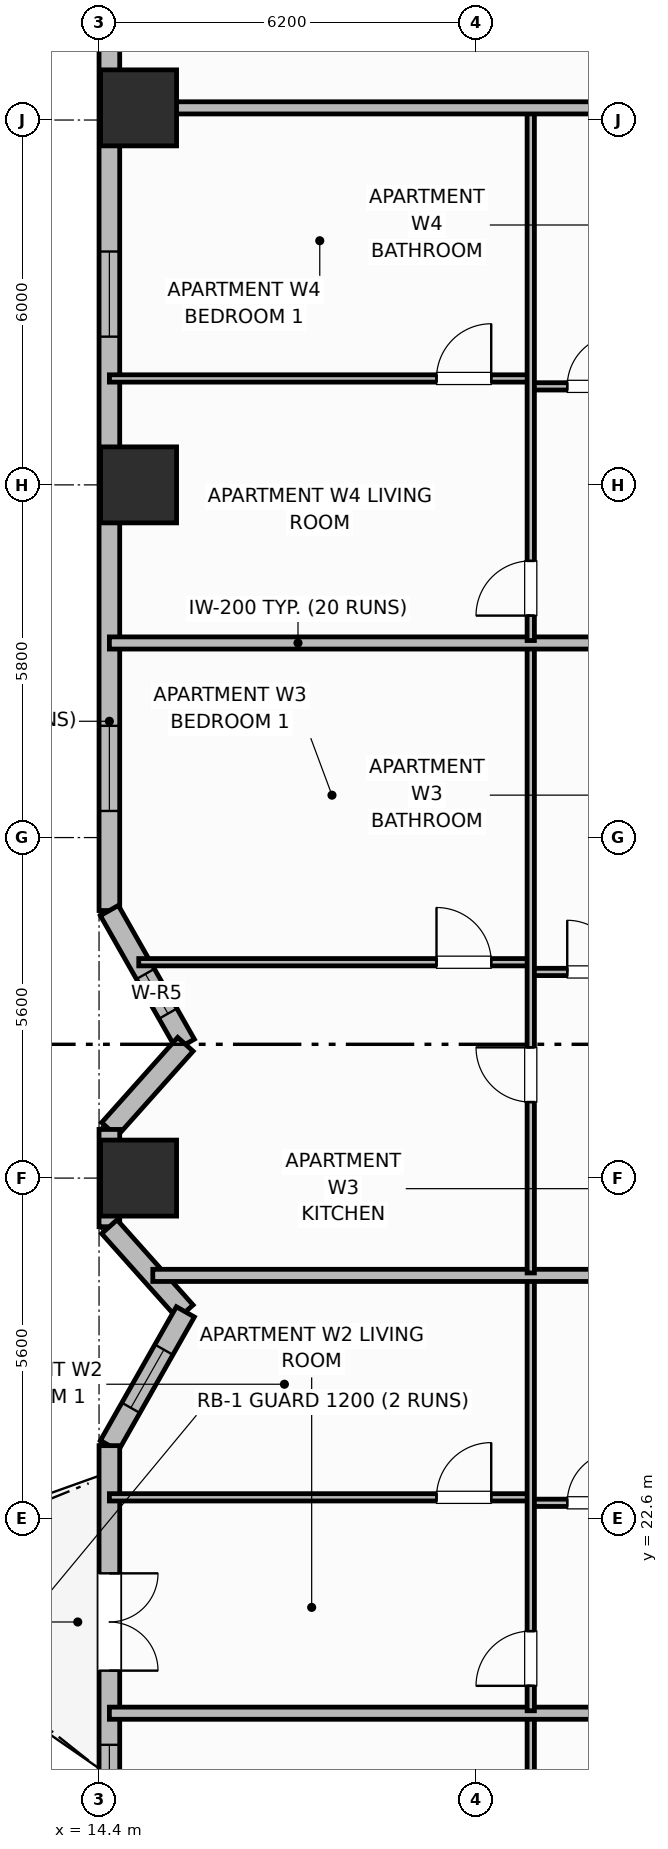
"""IFC4 building model, lengths in metres.
Left out: names, types, materials, properties, quantities, classifications, styles, units other than length and angle.
Written with IfcOpenShell. Run it as: python <this file> out.ifc"""

import sys

from ifc_helpers import new_model, si_unit, direction, frame, frame_2d, origin, origin_2d, place, context, subcontext, project, spatial, rectangle, extrude, element, fill, save


model = new_model("IFC4")
c1 = context("Model", 3, precision=1e-05, world=origin(), true_north=direction((0.0, 1.0)))
c2 = subcontext(c1, "Body", "Model", "MODEL_VIEW")
j1 = project(units=[si_unit("LENGTHUNIT", "METRE"), si_unit("PLANEANGLEUNIT", "RADIAN")], contexts=[c1])
p1 = place(None, origin())
s1 = spatial("IfcSite", under=j1, at=p1, CompositionType="ELEMENT")
p2 = place(p1, origin())
s2 = spatial("IfcBuilding", under=s1, at=p2, CompositionType="ELEMENT")
p3 = place(p2, frame((0.0, 0.0, 54.7)))
s3 = spatial("IfcBuildingStorey", under=s2, at=p3, CompositionType="ELEMENT", Elevation=54.7)
for number, where, z_axis, x_axis in (
    (1, (15.05, 28.2, 0.0), (0.0, 0.0, 1.0), (1.0, 0.0, 0.0)),
    (2, (15.05, 39.6, 0.0), (0.0, 0.0, 1.0), (1.0, 0.0, 0.0)),
    (3, (15.05, 45.8, 0.0), (0.0, 0.0, 1.0), (1.0, 0.0, 0.0)),
):
    element("IfcColumn", number, at=place(p3, frame(where, z_axis=z_axis, x_axis=x_axis)), inside=s3, PredefinedType="COLUMN", context=c2, shape_type="SweptSolid", body=[
        extrude(rectangle(XDim=1.25, YDim=1.25, at=origin_2d()), origin(), (0.0, 0.0, 1.0), 3.7),
    ])
p4 = place(p3, frame((14.57, 47.4, 0.0), z_axis=(0.0, 0.0, 1.0), x_axis=(0.0, -1.0, 0.0)))
e4 = element("IfcWall", 4, at=p4, inside=s3, PredefinedType="SOLIDWALL", context=c2, shape_type="SweptSolid", body=[
    extrude(rectangle(XDim=14.8, YDim=0.34, at=frame_2d((7.4, 0.0))), origin(), (0.0, 0.0, 1.0), 2.7),
])
p5 = place(p4, frame((3.962, 0.0, 0.73)))
e5 = element("IfcOpeningElement", 5, at=p5, cuts=e4, PredefinedType="OPENING", context=c2, shape_type="SweptSolid", body=[
    extrude(rectangle(XDim=1.4, YDim=1.85, at=frame_2d((0.7, 0.925))), frame((0.0, 0.18, 0.0), z_axis=(0.0, -1.0, 0.0), x_axis=(1.0, 0.0, 0.0)), (0.0, 0.0, 1.0), 0.36),
])
p6 = place(p4, frame((11.762, 0.0, 0.73)))
e6 = element("IfcOpeningElement", 6, at=p6, cuts=e4, PredefinedType="OPENING", context=c2, shape_type="SweptSolid", body=[
    extrude(rectangle(XDim=1.4, YDim=1.85, at=frame_2d((0.7, 0.925))), frame((0.0, 0.18, 0.0), z_axis=(0.0, -1.0, 0.0), x_axis=(1.0, 0.0, 0.0)), (0.0, 0.0, 1.0), 0.36),
])
p7 = place(p3, frame((14.57, 32.6, 0.0), z_axis=(0.0, 0.0, 1.0), x_axis=(0.493976255291, -0.869475393101, 0.0)))
e7 = element("IfcWall", 7, at=p7, inside=s3, PredefinedType="SOLIDWALL", context=c2, shape_type="SweptSolid", body=[
    extrude(rectangle(XDim=2.531, YDim=0.34, at=frame_2d((1.265, 0.0))), origin(), (0.0, 0.0, 1.0), 2.7),
])
p8 = place(p7, frame((1.2, 0.0, 0.89)))
e8 = element("IfcOpeningElement", 8, at=p8, cuts=e7, PredefinedType="OPENING", context=c2, shape_type="SweptSolid", body=[
    extrude(rectangle(XDim=0.75, YDim=1.65, at=frame_2d((0.375, 0.825))), frame((0.0, 0.18, 0.0), z_axis=(0.0, -1.0, 0.0), x_axis=(1.0, 0.0, 0.0)), (0.0, 0.0, 1.0), 0.36),
])
p9 = place(p3, frame((15.82, 30.4, 0.0), z_axis=(0.0, 0.0, 1.0), x_axis=(-0.666041619974, -0.74591457987, 0.0)))
e9 = element("IfcWall", 9, at=p9, inside=s3, PredefinedType="SOLIDWALL", context=c2, shape_type="SweptSolid", body=[
    extrude(rectangle(XDim=1.877, YDim=0.34, at=frame_2d((0.938, 0.0))), origin(), (0.0, 0.0, 1.0), 2.7),
])
p10 = place(p3, frame((14.57, 29.0, 0.0), z_axis=(0.0, 0.0, 1.0), x_axis=(0.0, -1.0, 0.0)))
e10 = element("IfcWall", 10, at=p10, inside=s3, PredefinedType="SOLIDWALL", context=c2, shape_type="SweptSolid", body=[
    extrude(rectangle(XDim=1.6, YDim=0.34, at=frame_2d((0.8, 0.0))), origin(), (0.0, 0.0, 1.0), 2.7),
])
p11 = place(p3, frame((14.57, 27.4, 0.0), z_axis=(0.0, 0.0, 1.0), x_axis=(0.666041619974, -0.74591457987, 0.0)))
e11 = element("IfcWall", 11, at=p11, inside=s3, PredefinedType="SOLIDWALL", context=c2, shape_type="SweptSolid", body=[
    extrude(rectangle(XDim=1.877, YDim=0.34, at=frame_2d((0.938, 0.0))), origin(), (0.0, 0.0, 1.0), 2.7),
])
p12 = place(p3, frame((15.82, 26.0, 0.0), z_axis=(0.0, 0.0, 1.0), x_axis=(-0.494017696272, -0.869451847873, 0.0)))
e12 = element("IfcWall", 12, at=p12, inside=s3, PredefinedType="SOLIDWALL", context=c2, shape_type="SweptSolid", body=[
    extrude(rectangle(XDim=2.53, YDim=0.34, at=frame_2d((1.265, 0.0))), origin(), (0.0, 0.0, 1.0), 2.7),
])
p13 = place(p12, frame((0.715, 0.0, 0.89)))
e13 = element("IfcOpeningElement", 13, at=p13, cuts=e12, PredefinedType="OPENING", context=c2, shape_type="SweptSolid", body=[
    extrude(rectangle(XDim=1.1, YDim=1.65, at=frame_2d((0.55, 0.825))), frame((0.0, 0.18, 0.0), z_axis=(0.0, -1.0, 0.0), x_axis=(1.0, 0.0, 0.0)), (0.0, 0.0, 1.0), 0.36),
])
p14 = place(p3, frame((14.57, 23.8, 0.0), z_axis=(0.0, 0.0, 1.0), x_axis=(0.0, -1.0, 0.0)))
e14 = element("IfcWall", 14, at=p14, inside=s3, PredefinedType="SOLIDWALL", context=c2, shape_type="SweptSolid", body=[
    extrude(rectangle(XDim=14.8, YDim=0.34, at=frame_2d((7.4, 0.0))), origin(), (0.0, 0.0, 1.0), 2.7),
])
p15 = place(p14, frame((2.1, 0.0, 0.0)))
e15 = element("IfcOpeningElement", 15, at=p15, cuts=e14, PredefinedType="OPENING", context=c2, shape_type="SweptSolid", body=[
    extrude(rectangle(XDim=1.6, YDim=2.1, at=frame_2d((0.8, 1.05))), frame((0.0, 0.18, 0.0), z_axis=(0.0, -1.0, 0.0), x_axis=(1.0, 0.0, 0.0)), (0.0, 0.0, 1.0), 0.36),
])
p16 = place(p14, frame((4.92, 0.0, 0.69)))
e16 = element("IfcOpeningElement", 16, at=p16, cuts=e14, PredefinedType="OPENING", context=c2, shape_type="SweptSolid", body=[
    extrude(rectangle(XDim=1.4, YDim=1.85, at=frame_2d((0.7, 0.925))), frame((0.0, 0.18, 0.0), z_axis=(0.0, -1.0, 0.0), x_axis=(1.0, 0.0, 0.0)), (0.0, 0.0, 1.0), 0.36),
])
p17 = place(p14, frame((9.55, 0.0, 0.93)))
e17 = element("IfcOpeningElement", 17, at=p17, cuts=e14, PredefinedType="OPENING", context=c2, shape_type="SweptSolid", body=[
    extrude(rectangle(XDim=1.1, YDim=1.65, at=frame_2d((0.55, 0.825))), frame((0.0, 0.18, 0.0), z_axis=(0.0, -1.0, 0.0), x_axis=(1.0, 0.0, 0.0)), (0.0, 0.0, 1.0), 0.36),
])
p18 = place(p3, frame((21.5, 10.64, 0.0), z_axis=(0.0, 0.0, 1.0), x_axis=(0.0, 1.0, 0.0)))
e18 = element("IfcWall", 18, at=p18, inside=s3, PredefinedType="PARTITIONING", context=c2, shape_type="SweptSolid", body=[
    extrude(rectangle(XDim=8.72, YDim=0.12, at=frame_2d((4.36, 0.0))), origin(), (0.0, 0.0, 1.0), 2.53),
])
p19 = place(p18, frame((0.41, 0.0, 0.0)))
e19 = element("IfcOpeningElement", 19, at=p19, cuts=e18, PredefinedType="OPENING", context=c2, shape_type="SweptSolid", body=[
    extrude(rectangle(XDim=0.9, YDim=2.1, at=frame_2d((0.45, 1.05))), frame((0.0, 0.07, 0.0), z_axis=(0.0, -1.0, 0.0), x_axis=(1.0, 0.0, 0.0)), (0.0, 0.0, 1.0), 0.14),
])
p20 = place(p3, frame((14.57, 19.4, 0.0), z_axis=(0.0, 0.0, 1.0), x_axis=(1.0, 0.0, 0.0)))
e20 = element("IfcWall", 20, at=p20, inside=s3, PredefinedType="PARTITIONING", context=c2, shape_type="SweptSolid", body=[
    extrude(rectangle(XDim=9.18, YDim=0.2, at=frame_2d((4.59, 0.0))), origin(), (0.0, 0.0, 1.0), 2.53),
])
p21 = place(p3, frame((21.5, 22.86, 0.0), z_axis=(0.0, 0.0, 1.0), x_axis=(1.0, 0.0, 0.0)))
e21 = element("IfcWall", 21, at=p21, inside=s3, PredefinedType="PARTITIONING", context=c2, shape_type="SweptSolid", body=[
    extrude(rectangle(XDim=2.25, YDim=0.12, at=frame_2d((1.125, 0.0))), origin(), (0.0, 0.0, 1.0), 2.53),
])
p22 = place(p21, frame((0.6, 0.0, 0.0)))
e22 = element("IfcOpeningElement", 22, at=p22, cuts=e21, PredefinedType="OPENING", context=c2, shape_type="SweptSolid", body=[
    extrude(rectangle(XDim=0.85, YDim=2.1, at=frame_2d((0.425, 1.05))), frame((0.0, 0.07, 0.0), z_axis=(0.0, -1.0, 0.0), x_axis=(1.0, 0.0, 0.0)), (0.0, 0.0, 1.0), 0.14),
])
p23 = place(p3, frame((14.57, 22.95, 0.0), z_axis=(0.0, 0.0, 1.0), x_axis=(1.0, 0.0, 0.0)))
e23 = element("IfcWall", 23, at=p23, inside=s3, PredefinedType="PARTITIONING", context=c2, shape_type="SweptSolid", body=[
    extrude(rectangle(XDim=6.93, YDim=0.12, at=frame_2d((3.465, 0.0))), origin(), (0.0, 0.0, 1.0), 2.53),
])
p24 = place(p23, frame((5.38, 0.0, 0.0)))
e24 = element("IfcOpeningElement", 24, at=p24, cuts=e23, PredefinedType="OPENING", context=c2, shape_type="SweptSolid", body=[
    extrude(rectangle(XDim=0.9, YDim=2.1, at=frame_2d((0.45, 1.05))), frame((0.0, 0.07, 0.0), z_axis=(0.0, -1.0, 0.0), x_axis=(1.0, 0.0, 0.0)), (0.0, 0.0, 1.0), 0.14),
])
p25 = place(p3, frame((21.5, 19.44, 0.0), z_axis=(0.0, 0.0, 1.0), x_axis=(0.0, 1.0, 0.0)))
e25 = element("IfcWall", 25, at=p25, inside=s3, PredefinedType="PARTITIONING", context=c2, shape_type="SweptSolid", body=[
    extrude(rectangle(XDim=7.12, YDim=0.12, at=frame_2d((3.56, 0.0))), origin(), (0.0, 0.0, 1.0), 2.53),
])
p26 = place(p25, frame((0.41, 0.0, 0.0)))
e26 = element("IfcOpeningElement", 26, at=p26, cuts=e25, PredefinedType="OPENING", context=c2, shape_type="SweptSolid", body=[
    extrude(rectangle(XDim=0.9, YDim=2.1, at=frame_2d((0.45, 1.05))), frame((0.0, 0.07, 0.0), z_axis=(0.0, -1.0, 0.0), x_axis=(1.0, 0.0, 0.0)), (0.0, 0.0, 1.0), 0.14),
])
p27 = place(p3, frame((15.284, 26.6, 0.0), z_axis=(0.0, 0.0, 1.0), x_axis=(1.0, 0.0, 0.0)))
e27 = element("IfcWall", 27, at=p27, inside=s3, PredefinedType="PARTITIONING", context=c2, shape_type="SweptSolid", body=[
    extrude(rectangle(XDim=8.466, YDim=0.2, at=frame_2d((4.233, 0.0))), origin(), (0.0, 0.0, 1.0), 2.53),
])
p28 = place(p3, frame((21.5, 31.59, 0.0), z_axis=(0.0, 0.0, 1.0), x_axis=(1.0, 0.0, 0.0)))
e28 = element("IfcWall", 28, at=p28, inside=s3, PredefinedType="PARTITIONING", context=c2, shape_type="SweptSolid", body=[
    extrude(rectangle(XDim=2.25, YDim=0.12, at=frame_2d((1.125, 0.0))), origin(), (0.0, 0.0, 1.0), 2.53),
])
p29 = place(p28, frame((0.6, 0.0, 0.0)))
e29 = element("IfcOpeningElement", 29, at=p29, cuts=e28, PredefinedType="OPENING", context=c2, shape_type="SweptSolid", body=[
    extrude(rectangle(XDim=0.85, YDim=2.1, at=frame_2d((0.425, 1.05))), frame((0.0, 0.07, 0.0), z_axis=(0.0, -1.0, 0.0), x_axis=(1.0, 0.0, 0.0)), (0.0, 0.0, 1.0), 0.14),
])
p30 = place(p3, frame((15.053, 31.75, 0.0), z_axis=(0.0, 0.0, 1.0), x_axis=(1.0, 0.0, 0.0)))
e30 = element("IfcWall", 30, at=p30, inside=s3, PredefinedType="PARTITIONING", context=c2, shape_type="SweptSolid", body=[
    extrude(rectangle(XDim=6.447, YDim=0.12, at=frame_2d((3.224, 0.0))), origin(), (0.0, 0.0, 1.0), 2.53),
])
p31 = place(p30, frame((4.897, 0.0, 0.0)))
e31 = element("IfcOpeningElement", 31, at=p31, cuts=e30, PredefinedType="OPENING", context=c2, shape_type="SweptSolid", body=[
    extrude(rectangle(XDim=0.9, YDim=2.1, at=frame_2d((0.45, 1.05))), frame((0.0, 0.07, 0.0), z_axis=(0.0, -1.0, 0.0), x_axis=(1.0, 0.0, 0.0)), (0.0, 0.0, 1.0), 0.14),
])
p32 = place(p3, frame((21.5, 26.64, 0.0), z_axis=(0.0, 0.0, 1.0), x_axis=(0.0, 1.0, 0.0)))
e32 = element("IfcWall", 32, at=p32, inside=s3, PredefinedType="PARTITIONING", context=c2, shape_type="SweptSolid", body=[
    extrude(rectangle(XDim=10.32, YDim=0.12, at=frame_2d((5.16, 0.0))), origin(), (0.0, 0.0, 1.0), 2.53),
])
p33 = place(p32, frame((2.81, 0.0, 0.0)))
e33 = element("IfcOpeningElement", 33, at=p33, cuts=e32, PredefinedType="OPENING", context=c2, shape_type="SweptSolid", body=[
    extrude(rectangle(XDim=0.9, YDim=2.1, at=frame_2d((0.45, 1.05))), frame((0.0, 0.07, 0.0), z_axis=(0.0, -1.0, 0.0), x_axis=(1.0, 0.0, 0.0)), (0.0, 0.0, 1.0), 0.14),
])
p34 = place(p3, frame((14.57, 37.0, 0.0), z_axis=(0.0, 0.0, 1.0), x_axis=(1.0, 0.0, 0.0)))
e34 = element("IfcWall", 34, at=p34, inside=s3, PredefinedType="PARTITIONING", context=c2, shape_type="SweptSolid", body=[
    extrude(rectangle(XDim=9.18, YDim=0.2, at=frame_2d((4.59, 0.0))), origin(), (0.0, 0.0, 1.0), 2.53),
])
p35 = place(p3, frame((21.5, 41.22, 0.0), z_axis=(0.0, 0.0, 1.0), x_axis=(1.0, 0.0, 0.0)))
e35 = element("IfcWall", 35, at=p35, inside=s3, PredefinedType="PARTITIONING", context=c2, shape_type="SweptSolid", body=[
    extrude(rectangle(XDim=2.25, YDim=0.12, at=frame_2d((1.125, 0.0))), origin(), (0.0, 0.0, 1.0), 2.53),
])
p36 = place(p35, frame((0.6, 0.0, 0.0)))
e36 = element("IfcOpeningElement", 36, at=p36, cuts=e35, PredefinedType="OPENING", context=c2, shape_type="SweptSolid", body=[
    extrude(rectangle(XDim=0.85, YDim=2.1, at=frame_2d((0.425, 1.05))), frame((0.0, 0.07, 0.0), z_axis=(0.0, -1.0, 0.0), x_axis=(1.0, 0.0, 0.0)), (0.0, 0.0, 1.0), 0.14),
])
p37 = place(p3, frame((14.57, 41.35, 0.0), z_axis=(0.0, 0.0, 1.0), x_axis=(1.0, 0.0, 0.0)))
e37 = element("IfcWall", 37, at=p37, inside=s3, PredefinedType="PARTITIONING", context=c2, shape_type="SweptSolid", body=[
    extrude(rectangle(XDim=6.93, YDim=0.12, at=frame_2d((3.465, 0.0))), origin(), (0.0, 0.0, 1.0), 2.53),
])
p38 = place(p37, frame((5.38, 0.0, 0.0)))
e38 = element("IfcOpeningElement", 38, at=p38, cuts=e37, PredefinedType="OPENING", context=c2, shape_type="SweptSolid", body=[
    extrude(rectangle(XDim=0.9, YDim=2.1, at=frame_2d((0.45, 1.05))), frame((0.0, 0.07, 0.0), z_axis=(0.0, -1.0, 0.0), x_axis=(1.0, 0.0, 0.0)), (0.0, 0.0, 1.0), 0.14),
])
p39 = place(p3, frame((21.5, 37.04, 0.0), z_axis=(0.0, 0.0, 1.0), x_axis=(0.0, 1.0, 0.0)))
e39 = element("IfcWall", 39, at=p39, inside=s3, PredefinedType="PARTITIONING", context=c2, shape_type="SweptSolid", body=[
    extrude(rectangle(XDim=8.72, YDim=0.12, at=frame_2d((4.36, 0.0))), origin(), (0.0, 0.0, 1.0), 2.53),
])
p40 = place(p39, frame((0.41, 0.0, 0.0)))
e40 = element("IfcOpeningElement", 40, at=p40, cuts=e39, PredefinedType="OPENING", context=c2, shape_type="SweptSolid", body=[
    extrude(rectangle(XDim=0.9, YDim=2.1, at=frame_2d((0.45, 1.05))), frame((0.0, 0.07, 0.0), z_axis=(0.0, -1.0, 0.0), x_axis=(1.0, 0.0, 0.0)), (0.0, 0.0, 1.0), 0.14),
])
p41 = place(p3, frame((14.99, 45.8, 0.0), z_axis=(0.0, 0.0, 1.0), x_axis=(1.0, 0.0, 0.0)))
e41 = element("IfcWall", 41, at=p41, inside=s3, PredefinedType="PARTITIONING", context=c2, shape_type="SweptSolid", body=[
    extrude(rectangle(XDim=8.76, YDim=0.2, at=frame_2d((4.38, 0.0))), origin(), (0.0, 0.0, 1.0), 2.53),
])
p42 = place(p5, origin())
e42 = element("IfcWindow", 42, at=p42, inside=s3, PartitioningType="SINGLE_PANEL", PredefinedType="WINDOW", context=c2, shape_type="SweptSolid", body=[
    extrude(rectangle(XDim=1.4, YDim=1.85, at=frame_2d((0.7, 0.925))), frame((0.0, 0.03, 0.0), z_axis=(0.0, -1.0, 0.0), x_axis=(1.0, 0.0, 0.0)), (0.0, 0.0, 1.0), 0.06),
])
fill(e5, e42)
p43 = place(p6, origin())
e43 = element("IfcWindow", 43, at=p43, inside=s3, PartitioningType="SINGLE_PANEL", PredefinedType="WINDOW", context=c2, shape_type="SweptSolid", body=[
    extrude(rectangle(XDim=1.4, YDim=1.85, at=frame_2d((0.7, 0.925))), frame((0.0, 0.03, 0.0), z_axis=(0.0, -1.0, 0.0), x_axis=(1.0, 0.0, 0.0)), (0.0, 0.0, 1.0), 0.06),
])
fill(e6, e43)
p44 = place(p8, origin())
e44 = element("IfcWindow", 44, at=p44, inside=s3, PartitioningType="SINGLE_PANEL", PredefinedType="WINDOW", context=c2, shape_type="SweptSolid", body=[
    extrude(rectangle(XDim=0.75, YDim=1.65, at=frame_2d((0.375, 0.825))), frame((0.0, 0.03, 0.0), z_axis=(0.0, -1.0, 0.0), x_axis=(1.0, 0.0, 0.0)), (0.0, 0.0, 1.0), 0.06),
])
fill(e8, e44)
p45 = place(p13, origin())
e45 = element("IfcWindow", 45, at=p45, inside=s3, PartitioningType="SINGLE_PANEL", PredefinedType="WINDOW", context=c2, shape_type="SweptSolid", body=[
    extrude(rectangle(XDim=1.1, YDim=1.65, at=frame_2d((0.55, 0.825))), frame((0.0, 0.03, 0.0), z_axis=(0.0, -1.0, 0.0), x_axis=(1.0, 0.0, 0.0)), (0.0, 0.0, 1.0), 0.06),
])
fill(e13, e45)
p46 = place(p15, origin())
e46 = element("IfcDoor", 46, at=p46, inside=s3, OperationType="DOUBLE_DOOR_SINGLE_SWING", PredefinedType="DOOR", context=c2, shape_type="SweptSolid", body=[
    extrude(rectangle(XDim=1.6, YDim=2.1, at=frame_2d((0.8, 1.05))), frame((0.0, 0.025, 0.0), z_axis=(0.0, -1.0, 0.0), x_axis=(1.0, 0.0, 0.0)), (0.0, 0.0, 1.0), 0.05),
])
fill(e15, e46)
p47 = place(p16, origin())
e47 = element("IfcWindow", 47, at=p47, inside=s3, PartitioningType="SINGLE_PANEL", PredefinedType="WINDOW", context=c2, shape_type="SweptSolid", body=[
    extrude(rectangle(XDim=1.4, YDim=1.85, at=frame_2d((0.7, 0.925))), frame((0.0, 0.03, 0.0), z_axis=(0.0, -1.0, 0.0), x_axis=(1.0, 0.0, 0.0)), (0.0, 0.0, 1.0), 0.06),
])
fill(e16, e47)
p48 = place(p22, origin())
e48 = element("IfcDoor", 48, at=p48, inside=s3, OperationType="SINGLE_SWING_RIGHT", PredefinedType="DOOR", context=c2, shape_type="SweptSolid", body=[
    extrude(rectangle(XDim=0.85, YDim=2.1, at=frame_2d((0.425, 1.05))), frame((0.0, 0.025, 0.0), z_axis=(0.0, -1.0, 0.0), x_axis=(1.0, 0.0, 0.0)), (0.0, 0.0, 1.0), 0.05),
])
fill(e22, e48)
p49 = place(p24, origin())
e49 = element("IfcDoor", 49, at=p49, inside=s3, OperationType="SINGLE_SWING_RIGHT", PredefinedType="DOOR", context=c2, shape_type="SweptSolid", body=[
    extrude(rectangle(XDim=0.9, YDim=2.1, at=frame_2d((0.45, 1.05))), frame((0.0, 0.025, 0.0), z_axis=(0.0, -1.0, 0.0), x_axis=(1.0, 0.0, 0.0)), (0.0, 0.0, 1.0), 0.05),
])
fill(e24, e49)
p50 = place(p26, origin())
e50 = element("IfcDoor", 50, at=p50, inside=s3, OperationType="SINGLE_SWING_LEFT", PredefinedType="DOOR", context=c2, shape_type="SweptSolid", body=[
    extrude(rectangle(XDim=0.9, YDim=2.1, at=frame_2d((0.45, 1.05))), frame((0.0, 0.025, 0.0), z_axis=(0.0, -1.0, 0.0), x_axis=(1.0, 0.0, 0.0)), (0.0, 0.0, 1.0), 0.05),
])
fill(e26, e50)
p51 = place(p29, origin())
e51 = element("IfcDoor", 51, at=p51, inside=s3, OperationType="SINGLE_SWING_LEFT", PredefinedType="DOOR", context=c2, shape_type="SweptSolid", body=[
    extrude(rectangle(XDim=0.85, YDim=2.1, at=frame_2d((0.425, 1.05))), frame((0.0, 0.025, 0.0), z_axis=(0.0, -1.0, 0.0), x_axis=(1.0, 0.0, 0.0)), (0.0, 0.0, 1.0), 0.05),
])
fill(e29, e51)
p52 = place(p31, origin())
e52 = element("IfcDoor", 52, at=p52, inside=s3, OperationType="SINGLE_SWING_LEFT", PredefinedType="DOOR", context=c2, shape_type="SweptSolid", body=[
    extrude(rectangle(XDim=0.9, YDim=2.1, at=frame_2d((0.45, 1.05))), frame((0.0, 0.025, 0.0), z_axis=(0.0, -1.0, 0.0), x_axis=(1.0, 0.0, 0.0)), (0.0, 0.0, 1.0), 0.05),
])
fill(e31, e52)
p53 = place(p33, origin())
e53 = element("IfcDoor", 53, at=p53, inside=s3, OperationType="SINGLE_SWING_RIGHT", PredefinedType="DOOR", context=c2, shape_type="SweptSolid", body=[
    extrude(rectangle(XDim=0.9, YDim=2.1, at=frame_2d((0.45, 1.05))), frame((0.0, 0.025, 0.0), z_axis=(0.0, -1.0, 0.0), x_axis=(1.0, 0.0, 0.0)), (0.0, 0.0, 1.0), 0.05),
])
fill(e33, e53)
p54 = place(p36, origin())
e54 = element("IfcDoor", 54, at=p54, inside=s3, OperationType="SINGLE_SWING_RIGHT", PredefinedType="DOOR", context=c2, shape_type="SweptSolid", body=[
    extrude(rectangle(XDim=0.85, YDim=2.1, at=frame_2d((0.425, 1.05))), frame((0.0, 0.025, 0.0), z_axis=(0.0, -1.0, 0.0), x_axis=(1.0, 0.0, 0.0)), (0.0, 0.0, 1.0), 0.05),
])
fill(e36, e54)
p55 = place(p38, origin())
e55 = element("IfcDoor", 55, at=p55, inside=s3, OperationType="SINGLE_SWING_RIGHT", PredefinedType="DOOR", context=c2, shape_type="SweptSolid", body=[
    extrude(rectangle(XDim=0.9, YDim=2.1, at=frame_2d((0.45, 1.05))), frame((0.0, 0.025, 0.0), z_axis=(0.0, -1.0, 0.0), x_axis=(1.0, 0.0, 0.0)), (0.0, 0.0, 1.0), 0.05),
])
fill(e38, e55)
p56 = place(p40, origin())
e56 = element("IfcDoor", 56, at=p56, inside=s3, OperationType="SINGLE_SWING_LEFT", PredefinedType="DOOR", context=c2, shape_type="SweptSolid", body=[
    extrude(rectangle(XDim=0.9, YDim=2.1, at=frame_2d((0.45, 1.05))), frame((0.0, 0.025, 0.0), z_axis=(0.0, -1.0, 0.0), x_axis=(1.0, 0.0, 0.0)), (0.0, 0.0, 1.0), 0.05),
])
fill(e40, e56)
save(model, sys.argv[1])
